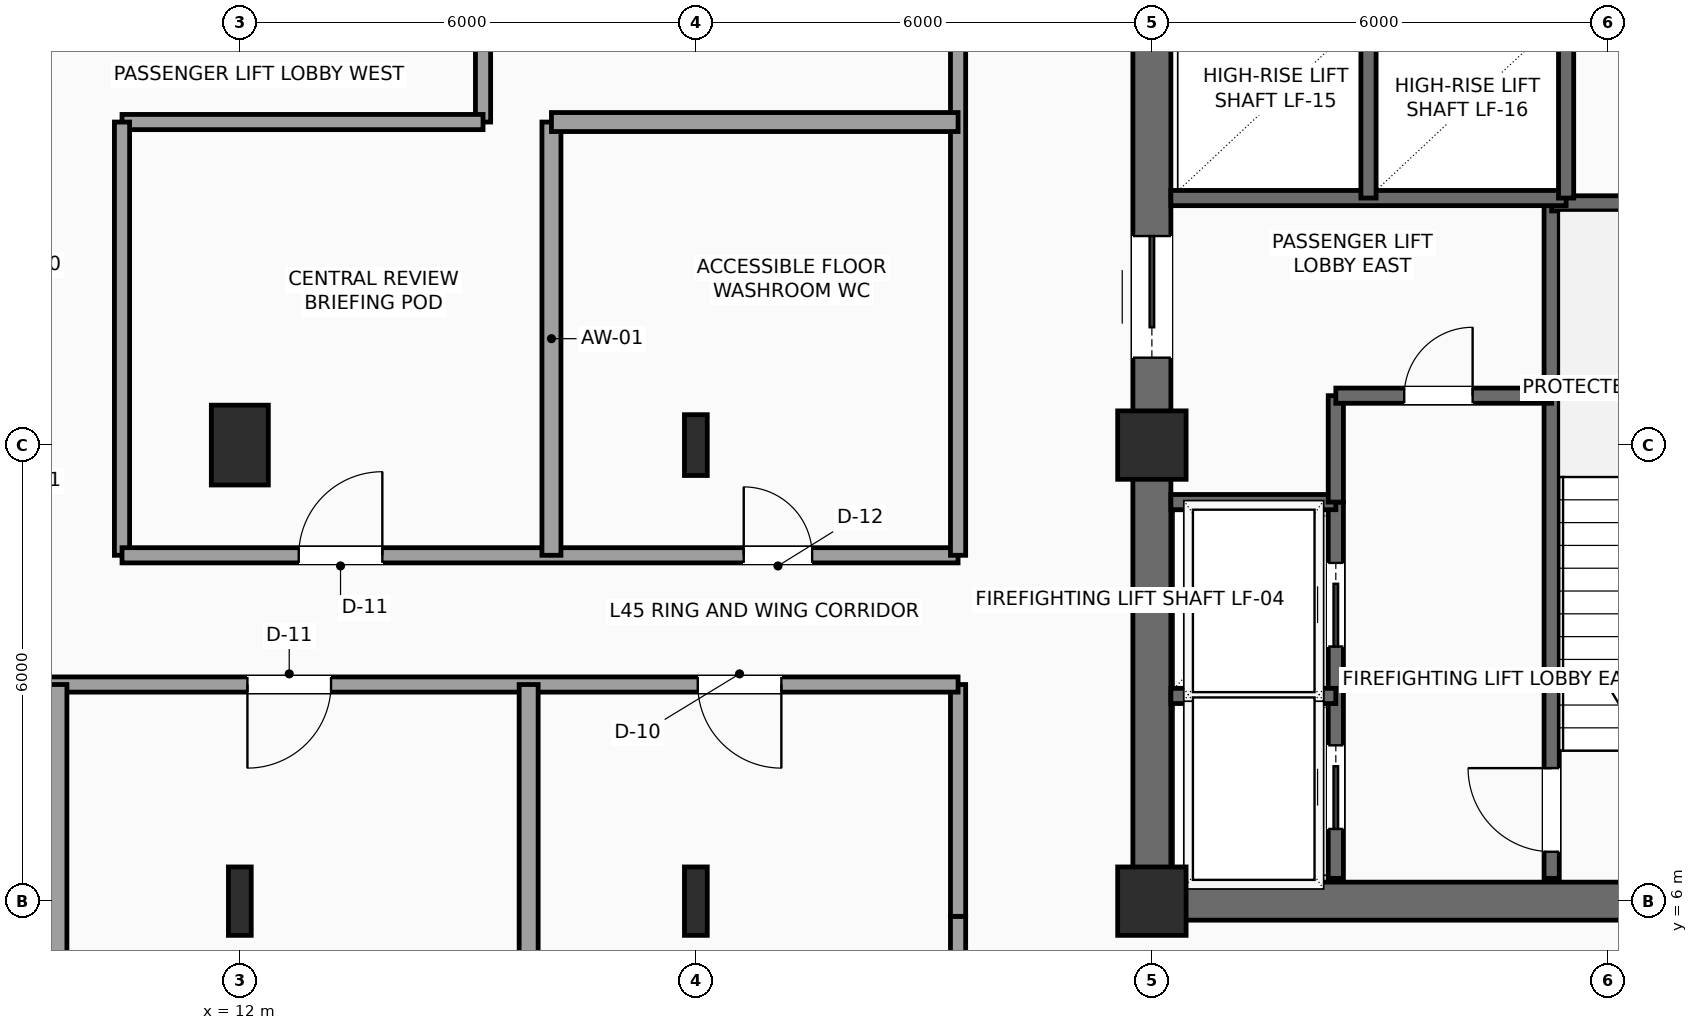
"""IFC4 building model, lengths in metres.
Left out: names, types, materials, properties, quantities, classifications, styles, units other than length and angle.
Written with IfcOpenShell. Run it as: python <this file> out.ifc"""

import sys

from ifc_helpers import new_model, si_unit, direction, frame, frame_2d, origin, origin_2d, place, context, subcontext, project, spatial, rectangle, i_section, extrude, element, fill, save


model = new_model("IFC4")
c1 = context("Model", 3, precision=1e-05, world=origin(), true_north=direction((0.0, 1.0)))
c2 = subcontext(c1, "Body", "Model", "MODEL_VIEW")
j1 = project(units=[si_unit("LENGTHUNIT", "METRE"), si_unit("PLANEANGLEUNIT", "RADIAN")], contexts=[c1])
p1 = place(None, origin())
s1 = spatial("IfcSite", under=j1, at=p1, CompositionType="ELEMENT")
p2 = place(p1, origin())
s2 = spatial("IfcBuilding", under=s1, at=p2, CompositionType="ELEMENT")
p3 = place(p2, frame((0.0, 0.0, 184.2)))
s3 = spatial("IfcBuildingStorey", under=s2, at=p3, CompositionType="ELEMENT", Elevation=184.2)
for number, where, z_axis, x_axis in (
    (1, (24.0, 6.0, 0.0), (0.0, 0.0, 1.0), (1.0, 0.0, 0.0)),
    (2, (24.0, 12.0, 0.0), (0.0, 0.0, 1.0), (1.0, 0.0, 0.0)),
):
    element("IfcColumn", number, at=place(p3, frame(where, z_axis=z_axis, x_axis=x_axis)), inside=s3, PredefinedType="COLUMN", context=c2, shape_type="SweptSolid", body=[
        extrude(rectangle(XDim=0.9, YDim=0.9, at=origin_2d()), origin(), (0.0, 0.0, 1.0), 3.75),
    ])
p4 = place(p3, frame((12.0, 6.0, 0.0), z_axis=(0.0, 0.0, 1.0), x_axis=(1.0, 0.0, 0.0)))
e3 = element("IfcColumn", 3, at=p4, inside=s3, PredefinedType="COLUMN", context=c2, shape_type="SweptSolid", body=[
    extrude(i_section(OverallWidth=0.3, OverallDepth=0.9, WebThickness=0.019, FlangeThickness=0.035, FilletRadius=0.03, at=origin_2d()), origin(), (0.0, 0.0, 1.0), 3.75),
])
p5 = place(p3, frame((12.0, 12.0, 0.0), z_axis=(0.0, 0.0, 1.0), x_axis=(1.0, 0.0, 0.0)))
e4 = element("IfcColumn", 4, at=p5, inside=s3, PredefinedType="COLUMN", context=c2, shape_type="SweptSolid", body=[
    extrude(rectangle(XDim=0.75, YDim=1.05, at=origin_2d()), origin(), (0.0, 0.0, 1.0), 3.75),
])
p6 = place(p3, frame((18.0, 6.0, 0.0), z_axis=(0.0, 0.0, 1.0), x_axis=(1.0, 0.0, 0.0)))
e5 = element("IfcColumn", 5, at=p6, inside=s3, PredefinedType="COLUMN", context=c2, shape_type="SweptSolid", body=[
    extrude(i_section(OverallWidth=0.3, OverallDepth=0.9, WebThickness=0.019, FlangeThickness=0.035, FilletRadius=0.03, at=origin_2d()), origin(), (0.0, 0.0, 1.0), 3.75),
])
p7 = place(p3, frame((18.0, 12.0, 0.0), z_axis=(0.0, 0.0, 1.0), x_axis=(1.0, 0.0, 0.0)))
e6 = element("IfcColumn", 6, at=p7, inside=s3, PredefinedType="COLUMN", context=c2, shape_type="SweptSolid", body=[
    extrude(i_section(OverallWidth=0.3, OverallDepth=0.8, WebThickness=0.018, FlangeThickness=0.033, FilletRadius=0.03, at=origin_2d()), origin(), (0.0, 0.0, 1.0), 3.75),
])
p8 = place(p3, frame((24.0, 6.0, 0.0), z_axis=(0.0, 0.0, 1.0), x_axis=(1.0, 0.0, 0.0)))
e7 = element("IfcWall", 7, at=p8, inside=s3, PredefinedType="SHEAR", context=c2, shape_type="SweptSolid", body=[
    extrude(rectangle(XDim=9.6, YDim=0.5, at=frame_2d((4.8, 0.0))), origin(), (0.0, 0.0, 1.0), 3.54),
])
p9 = place(p3, frame((24.0, 6.0, 0.0), z_axis=(0.0, 0.0, 1.0), x_axis=(0.0, 1.0, 0.0)))
e8 = element("IfcWall", 8, at=p9, inside=s3, PredefinedType="SHEAR", context=c2, shape_type="SweptSolid", body=[
    extrude(rectangle(XDim=12.0, YDim=0.5, at=frame_2d((6.0, 0.0))), origin(), (0.0, 0.0, 1.0), 3.54),
])
p10 = place(p9, frame((7.15, 0.0, 0.0)))
e9 = element("IfcOpeningElement", 9, at=p10, cuts=e8, PredefinedType="OPENING", context=c2, shape_type="SweptSolid", body=[
    extrude(rectangle(XDim=1.6, YDim=2.3, at=frame_2d((0.8, 1.15))), frame((0.0, 0.26, 0.0), z_axis=(0.0, -1.0, 0.0), x_axis=(1.0, 0.0, 0.0)), (0.0, 0.0, 1.0), 0.52),
])
p11 = place(p3, frame((29.26, 6.3, 0.0), z_axis=(0.0, 0.0, 1.0), x_axis=(0.0, 1.0, 0.0)))
e10 = element("IfcWall", 10, at=p11, inside=s3, PredefinedType="SHEAR", context=c2, shape_type="SweptSolid", body=[
    extrude(rectangle(XDim=8.88, YDim=0.2, at=frame_2d((4.44, 0.0))), origin(), (0.0, 0.0, 1.0), 3.54),
])
p12 = place(p11, frame((0.35, 0.0, 0.0)))
e11 = element("IfcOpeningElement", 11, at=p12, cuts=e10, PredefinedType="OPENING", context=c2, shape_type="SweptSolid", body=[
    extrude(rectangle(XDim=1.1, YDim=2.2, at=frame_2d((0.55, 1.1))), frame((0.0, 0.11, 0.0), z_axis=(0.0, -1.0, 0.0), x_axis=(1.0, 0.0, 0.0)), (0.0, 0.0, 1.0), 0.22),
])
p13 = place(p3, frame((29.26, 15.18, 0.0), z_axis=(0.0, 0.0, 1.0), x_axis=(1.0, 0.0, 0.0)))
e12 = element("IfcWall", 12, at=p13, inside=s3, PredefinedType="SHEAR", context=c2, shape_type="SweptSolid", body=[
    extrude(rectangle(XDim=4.04, YDim=0.2, at=frame_2d((2.02, 0.0))), origin(), (0.0, 0.0, 1.0), 3.54),
])
p14 = place(p3, frame((26.42, 6.3, 0.0), z_axis=(0.0, 0.0, 1.0), x_axis=(0.0, 1.0, 0.0)))
e13 = element("IfcWall", 13, at=p14, inside=s3, PredefinedType="SHEAR", context=c2, shape_type="SweptSolid", body=[
    extrude(rectangle(XDim=4.95, YDim=0.2, at=frame_2d((2.475, 0.0))), origin(), (0.0, 0.0, 1.0), 3.54),
])
p15 = place(p14, frame((0.65, 0.0, 0.0)))
e14 = element("IfcOpeningElement", 14, at=p15, cuts=e13, PredefinedType="OPENING", context=c2, shape_type="SweptSolid", body=[
    extrude(rectangle(XDim=1.1, YDim=2.2, at=frame_2d((0.55, 1.1))), frame((0.0, 0.11, 0.0), z_axis=(0.0, -1.0, 0.0), x_axis=(1.0, 0.0, 0.0)), (0.0, 0.0, 1.0), 0.22),
])
p16 = place(p14, frame((3.05, 0.0, 0.0)))
e15 = element("IfcOpeningElement", 15, at=p16, cuts=e13, PredefinedType="OPENING", context=c2, shape_type="SweptSolid", body=[
    extrude(rectangle(XDim=1.1, YDim=2.2, at=frame_2d((0.55, 1.1))), frame((0.0, 0.11, 0.0), z_axis=(0.0, -1.0, 0.0), x_axis=(1.0, 0.0, 0.0)), (0.0, 0.0, 1.0), 0.22),
])
for number, where, z_axis, x_axis in (
    (16, (24.25, 8.7, 0.0), (0.0, 0.0, 1.0), (1.0, 0.0, 0.0)),
    (17, (24.25, 11.25, 0.0), (0.0, 0.0, 1.0), (1.0, 0.0, 0.0)),
):
    element("IfcWall", number, at=place(p3, frame(where, z_axis=z_axis, x_axis=x_axis)), inside=s3, PredefinedType="SHEAR", context=c2, shape_type="SweptSolid", body=[
        extrude(rectangle(XDim=2.17, YDim=0.2, at=frame_2d((1.085, 0.0))), origin(), (0.0, 0.0, 1.0), 3.54),
    ])
p17 = place(p3, frame((26.42, 11.25, 0.0), z_axis=(0.0, 0.0, 1.0), x_axis=(0.0, 1.0, 0.0)))
e18 = element("IfcWall", 18, at=p17, inside=s3, PredefinedType="SHEAR", context=c2, shape_type="SweptSolid", body=[
    extrude(rectangle(XDim=1.4, YDim=0.2, at=frame_2d((0.7, 0.0))), origin(), (0.0, 0.0, 1.0), 3.54),
])
p18 = place(p3, frame((26.42, 12.65, 0.0), z_axis=(0.0, 0.0, 1.0), x_axis=(1.0, 0.0, 0.0)))
e19 = element("IfcWall", 19, at=p18, inside=s3, PredefinedType="SHEAR", context=c2, shape_type="SweptSolid", body=[
    extrude(rectangle(XDim=2.84, YDim=0.2, at=frame_2d((1.42, 0.0))), origin(), (0.0, 0.0, 1.0), 3.54),
])
p19 = place(p18, frame((0.9, 0.0, 0.0)))
e20 = element("IfcOpeningElement", 20, at=p19, cuts=e19, PredefinedType="OPENING", context=c2, shape_type="SweptSolid", body=[
    extrude(rectangle(XDim=0.9, YDim=2.15, at=frame_2d((0.45, 1.075))), frame((0.0, 0.11, 0.0), z_axis=(0.0, -1.0, 0.0), x_axis=(1.0, 0.0, 0.0)), (0.0, 0.0, 1.0), 0.22),
])
p20 = place(p3, frame((24.25, 15.25, 0.0), z_axis=(0.0, 0.0, 1.0), x_axis=(1.0, 0.0, 0.0)))
e21 = element("IfcWall", 21, at=p20, inside=s3, PredefinedType="SHEAR", context=c2, shape_type="SweptSolid", body=[
    extrude(rectangle(XDim=5.2, YDim=0.2, at=frame_2d((2.6, 0.0))), origin(), (0.0, 0.0, 1.0), 3.54),
])
p21 = place(p3, frame((26.85, 15.25, 0.0), z_axis=(0.0, 0.0, 1.0), x_axis=(0.0, 1.0, 0.0)))
e22 = element("IfcWall", 22, at=p21, inside=s3, PredefinedType="SHEAR", context=c2, shape_type="SweptSolid", body=[
    extrude(rectangle(XDim=2.4, YDim=0.2, at=frame_2d((1.2, 0.0))), origin(), (0.0, 0.0, 1.0), 3.54),
])
p22 = place(p3, frame((29.45, 15.25, 0.0), z_axis=(0.0, 0.0, 1.0), x_axis=(0.0, 1.0, 0.0)))
e23 = element("IfcWall", 23, at=p22, inside=s3, PredefinedType="SHEAR", context=c2, shape_type="SweptSolid", body=[
    extrude(rectangle(XDim=2.45, YDim=0.2, at=frame_2d((1.225, 0.0))), origin(), (0.0, 0.0, 1.0), 3.54),
])
p23 = place(p3, frame((21.45, 3.85, 0.0), z_axis=(0.0, 0.0, 1.0), x_axis=(0.0, 1.0, 0.0)))
e24 = element("IfcWall", 24, at=p23, inside=s3, PredefinedType="SOLIDWALL", context=c2, shape_type="SweptSolid", body=[
    extrude(rectangle(XDim=1.95, YDim=0.2, at=frame_2d((0.975, 0.0))), origin(), (0.0, 0.0, 1.0), 3.54),
])
p24 = place(p3, frame((21.45, 5.8, 0.0), z_axis=(0.0, 0.0, 1.0), x_axis=(0.0, 1.0, 0.0)))
e25 = element("IfcWall", 25, at=p24, inside=s3, PredefinedType="SOLIDWALL", context=c2, shape_type="SweptSolid", body=[
    extrude(rectangle(XDim=3.05, YDim=0.2, at=frame_2d((1.525, 0.0))), origin(), (0.0, 0.0, 1.0), 3.54),
])
p25 = place(p3, frame((21.45, 8.85, 0.0), z_axis=(0.0, 0.0, 1.0), x_axis=(-1.0, 0.0, 0.0)))
e26 = element("IfcWall", 26, at=p25, inside=s3, PredefinedType="SOLIDWALL", context=c2, shape_type="SweptSolid", body=[
    extrude(rectangle(XDim=15.05, YDim=0.2, at=frame_2d((7.525, 0.0))), origin(), (0.0, 0.0, 1.0), 3.132),
])
p26 = place(p25, frame((12.95, 0.0, 0.0)))
e27 = element("IfcOpeningElement", 27, at=p26, cuts=e26, PredefinedType="OPENING", context=c2, shape_type="SweptSolid", body=[
    extrude(rectangle(XDim=1.1, YDim=2.25, at=frame_2d((0.55, 1.125))), frame((0.0, 0.11, 0.0), z_axis=(0.0, -1.0, 0.0), x_axis=(1.0, 0.0, 0.0)), (0.0, 0.0, 1.0), 0.22),
])
p27 = place(p25, frame((8.25, 0.0, 0.0)))
e28 = element("IfcOpeningElement", 28, at=p27, cuts=e26, PredefinedType="OPENING", context=c2, shape_type="SweptSolid", body=[
    extrude(rectangle(XDim=1.1, YDim=2.25, at=frame_2d((0.55, 1.125))), frame((0.0, 0.11, 0.0), z_axis=(0.0, -1.0, 0.0), x_axis=(1.0, 0.0, 0.0)), (0.0, 0.0, 1.0), 0.22),
])
p28 = place(p25, frame((2.325, 0.0, 0.0)))
e29 = element("IfcOpeningElement", 29, at=p28, cuts=e26, PredefinedType="OPENING", context=c2, shape_type="SweptSolid", body=[
    extrude(rectangle(XDim=1.1, YDim=2.25, at=frame_2d((0.55, 1.125))), frame((0.0, 0.11, 0.0), z_axis=(0.0, -1.0, 0.0), x_axis=(1.0, 0.0, 0.0)), (0.0, 0.0, 1.0), 0.22),
])
p29 = place(p3, frame((15.2, 17.95, 0.0), z_axis=(0.0, 0.0, 1.0), x_axis=(0.0, -1.0, 0.0)))
e30 = element("IfcWall", 30, at=p29, inside=s3, PredefinedType="SOLIDWALL", context=c2, shape_type="SweptSolid", body=[
    extrude(rectangle(XDim=1.7, YDim=0.2, at=frame_2d((0.85, 0.0))), origin(), (0.0, 0.0, 1.0), 3.54),
])
p30 = place(p3, frame((15.2, 16.25, 0.0), z_axis=(0.0, 0.0, 1.0), x_axis=(-1.0, 0.0, 0.0)))
e31 = element("IfcWall", 31, at=p30, inside=s3, PredefinedType="SOLIDWALL", context=c2, shape_type="SweptSolid", body=[
    extrude(rectangle(XDim=4.75, YDim=0.2, at=frame_2d((2.375, 0.0))), origin(), (0.0, 0.0, 1.0), 3.54),
])
p31 = place(p3, frame((10.45, 16.25, 0.0), z_axis=(0.0, 0.0, 1.0), x_axis=(0.0, -1.0, 0.0)))
e32 = element("IfcWall", 32, at=p31, inside=s3, PredefinedType="SOLIDWALL", context=c2, shape_type="SweptSolid", body=[
    extrude(rectangle(XDim=5.7, YDim=0.2, at=frame_2d((2.85, 0.0))), origin(), (0.0, 0.0, 1.0), 3.54),
])
p32 = place(p3, frame((10.45, 10.55, 0.0), z_axis=(0.0, 0.0, 1.0), x_axis=(1.0, 0.0, 0.0)))
e33 = element("IfcWall", 33, at=p32, inside=s3, PredefinedType="SOLIDWALL", context=c2, shape_type="SweptSolid", body=[
    extrude(rectangle(XDim=11.0, YDim=0.2, at=frame_2d((5.5, 0.0))), origin(), (0.0, 0.0, 1.0), 3.54),
])
p33 = place(p32, frame((2.325, 0.0, 0.0)))
e34 = element("IfcOpeningElement", 34, at=p33, cuts=e33, PredefinedType="OPENING", context=c2, shape_type="SweptSolid", body=[
    extrude(rectangle(XDim=1.1, YDim=2.25, at=frame_2d((0.55, 1.125))), frame((0.0, 0.11, 0.0), z_axis=(0.0, -1.0, 0.0), x_axis=(1.0, 0.0, 0.0)), (0.0, 0.0, 1.0), 0.22),
])
p34 = place(p32, frame((8.18, 0.0, 0.0)))
e35 = element("IfcOpeningElement", 35, at=p34, cuts=e33, PredefinedType="OPENING", context=c2, shape_type="SweptSolid", body=[
    extrude(rectangle(XDim=0.9, YDim=2.1, at=frame_2d((0.45, 1.05))), frame((0.0, 0.11, 0.0), z_axis=(0.0, -1.0, 0.0), x_axis=(1.0, 0.0, 0.0)), (0.0, 0.0, 1.0), 0.22),
])
p35 = place(p3, frame((21.45, 10.55, 0.0), z_axis=(0.0, 0.0, 1.0), x_axis=(0.0, 1.0, 0.0)))
e36 = element("IfcWall", 36, at=p35, inside=s3, PredefinedType="SOLIDWALL", context=c2, shape_type="SweptSolid", body=[
    extrude(rectangle(XDim=19.7, YDim=0.2, at=frame_2d((9.85, 0.0))), origin(), (0.0, 0.0, 1.0), 3.54),
])
p36 = place(p35, frame((9.4, 0.0, 0.0)))
e37 = element("IfcOpeningElement", 37, at=p36, cuts=e36, PredefinedType="OPENING", context=c2, shape_type="SweptSolid", body=[
    extrude(rectangle(XDim=0.95, YDim=2.15, at=frame_2d((0.475, 1.075))), frame((0.0, 0.11, 0.0), z_axis=(0.0, -1.0, 0.0), x_axis=(1.0, 0.0, 0.0)), (0.0, 0.0, 1.0), 0.22),
])
p37 = place(p35, frame((14.175, 0.0, 0.0)))
e38 = element("IfcOpeningElement", 38, at=p37, cuts=e36, PredefinedType="OPENING", context=c2, shape_type="SweptSolid", body=[
    extrude(rectangle(XDim=0.9, YDim=2.1, at=frame_2d((0.45, 1.05))), frame((0.0, 0.11, 0.0), z_axis=(0.0, -1.0, 0.0), x_axis=(1.0, 0.0, 0.0)), (0.0, 0.0, 1.0), 0.22),
])
p38 = place(p3, frame((16.1, 10.55, 0.0), z_axis=(0.0, 0.0, 1.0), x_axis=(0.0, 1.0, 0.0)))
e39 = element("IfcWall", 39, at=p38, inside=s3, PredefinedType="PARTITIONING", context=c2, shape_type="SweptSolid", body=[
    extrude(rectangle(XDim=5.7, YDim=0.25, at=frame_2d((2.85, 0.0))), origin(), (0.0, 0.0, 1.0), 3.54),
])
p39 = place(p3, frame((16.1, 16.25, 0.0), z_axis=(0.0, 0.0, 1.0), x_axis=(1.0, 0.0, 0.0)))
e40 = element("IfcWall", 40, at=p39, inside=s3, PredefinedType="PARTITIONING", context=c2, shape_type="SweptSolid", body=[
    extrude(rectangle(XDim=5.35, YDim=0.25, at=frame_2d((2.675, 0.0))), origin(), (0.0, 0.0, 1.0), 3.54),
])
for number, where, z_axis, x_axis in (
    (41, (9.6, 0.3, 0.0), (0.0, 0.0, 1.0), (0.0, 1.0, 0.0)),
    (42, (15.8, 0.3, 0.0), (0.0, 0.0, 1.0), (0.0, 1.0, 0.0)),
):
    element("IfcWall", number, at=place(p3, frame(where, z_axis=z_axis, x_axis=x_axis)), inside=s3, PredefinedType="PARTITIONING", context=c2, shape_type="SweptSolid", body=[
        extrude(rectangle(XDim=8.55, YDim=0.25, at=frame_2d((4.275, 0.0))), origin(), (0.0, 0.0, 1.0), 3.54),
    ])
p40 = place(p10, origin())
e43 = element("IfcDoor", 43, at=p40, inside=s3, OperationType="DOUBLE_DOOR_SLIDING", PredefinedType="DOOR", context=c2, shape_type="SweptSolid", body=[
    extrude(rectangle(XDim=1.6, YDim=2.3, at=frame_2d((0.8, 1.15))), frame((0.0, 0.025, 0.0), z_axis=(0.0, -1.0, 0.0), x_axis=(1.0, 0.0, 0.0)), (0.0, 0.0, 1.0), 0.05),
])
fill(e9, e43)
p41 = place(p12, origin())
e44 = element("IfcDoor", 44, at=p41, inside=s3, OperationType="SINGLE_SWING_RIGHT", PredefinedType="DOOR", context=c2, shape_type="SweptSolid", body=[
    extrude(rectangle(XDim=1.1, YDim=2.2, at=frame_2d((0.55, 1.1))), frame((0.0, 0.025, 0.0), z_axis=(0.0, -1.0, 0.0), x_axis=(1.0, 0.0, 0.0)), (0.0, 0.0, 1.0), 0.05),
])
fill(e11, e44)
p42 = place(p15, origin())
e45 = element("IfcDoor", 45, at=p42, inside=s3, OperationType="SLIDING_TO_LEFT", PredefinedType="DOOR", context=c2, shape_type="SweptSolid", body=[
    extrude(rectangle(XDim=1.1, YDim=2.2, at=frame_2d((0.55, 1.1))), frame((0.0, 0.025, 0.0), z_axis=(0.0, -1.0, 0.0), x_axis=(1.0, 0.0, 0.0)), (0.0, 0.0, 1.0), 0.05),
])
fill(e14, e45)
p43 = place(p16, origin())
e46 = element("IfcDoor", 46, at=p43, inside=s3, OperationType="SLIDING_TO_LEFT", PredefinedType="DOOR", context=c2, shape_type="SweptSolid", body=[
    extrude(rectangle(XDim=1.1, YDim=2.2, at=frame_2d((0.55, 1.1))), frame((0.0, 0.025, 0.0), z_axis=(0.0, -1.0, 0.0), x_axis=(1.0, 0.0, 0.0)), (0.0, 0.0, 1.0), 0.05),
])
fill(e15, e46)
p44 = place(p19, origin())
e47 = element("IfcDoor", 47, at=p44, inside=s3, OperationType="SINGLE_SWING_RIGHT", PredefinedType="DOOR", context=c2, shape_type="SweptSolid", body=[
    extrude(rectangle(XDim=0.9, YDim=2.15, at=frame_2d((0.45, 1.075))), frame((0.0, 0.025, 0.0), z_axis=(0.0, -1.0, 0.0), x_axis=(1.0, 0.0, 0.0)), (0.0, 0.0, 1.0), 0.05),
])
fill(e20, e47)
p45 = place(p27, origin())
e48 = element("IfcDoor", 48, at=p45, inside=s3, OperationType="SINGLE_SWING_RIGHT", PredefinedType="DOOR", context=c2, shape_type="SweptSolid", body=[
    extrude(rectangle(XDim=1.1, YDim=2.25, at=frame_2d((0.55, 1.125))), frame((0.0, 0.025, 0.0), z_axis=(0.0, -1.0, 0.0), x_axis=(1.0, 0.0, 0.0)), (0.0, 0.0, 1.0), 0.05),
])
fill(e28, e48)
p46 = place(p28, origin())
e49 = element("IfcDoor", 49, at=p46, inside=s3, OperationType="SINGLE_SWING_LEFT", PredefinedType="DOOR", context=c2, shape_type="SweptSolid", body=[
    extrude(rectangle(XDim=1.1, YDim=2.25, at=frame_2d((0.55, 1.125))), frame((0.0, 0.025, 0.0), z_axis=(0.0, -1.0, 0.0), x_axis=(1.0, 0.0, 0.0)), (0.0, 0.0, 1.0), 0.05),
])
fill(e29, e49)
p47 = place(p33, origin())
e50 = element("IfcDoor", 50, at=p47, inside=s3, OperationType="SINGLE_SWING_RIGHT", PredefinedType="DOOR", context=c2, shape_type="SweptSolid", body=[
    extrude(rectangle(XDim=1.1, YDim=2.25, at=frame_2d((0.55, 1.125))), frame((0.0, 0.025, 0.0), z_axis=(0.0, -1.0, 0.0), x_axis=(1.0, 0.0, 0.0)), (0.0, 0.0, 1.0), 0.05),
])
fill(e34, e50)
p48 = place(p34, origin())
e51 = element("IfcDoor", 51, at=p48, inside=s3, OperationType="SINGLE_SWING_LEFT", PredefinedType="DOOR", context=c2, shape_type="SweptSolid", body=[
    extrude(rectangle(XDim=0.9, YDim=2.1, at=frame_2d((0.45, 1.05))), frame((0.0, 0.025, 0.0), z_axis=(0.0, -1.0, 0.0), x_axis=(1.0, 0.0, 0.0)), (0.0, 0.0, 1.0), 0.05),
])
fill(e35, e51)
save(model, sys.argv[1])
